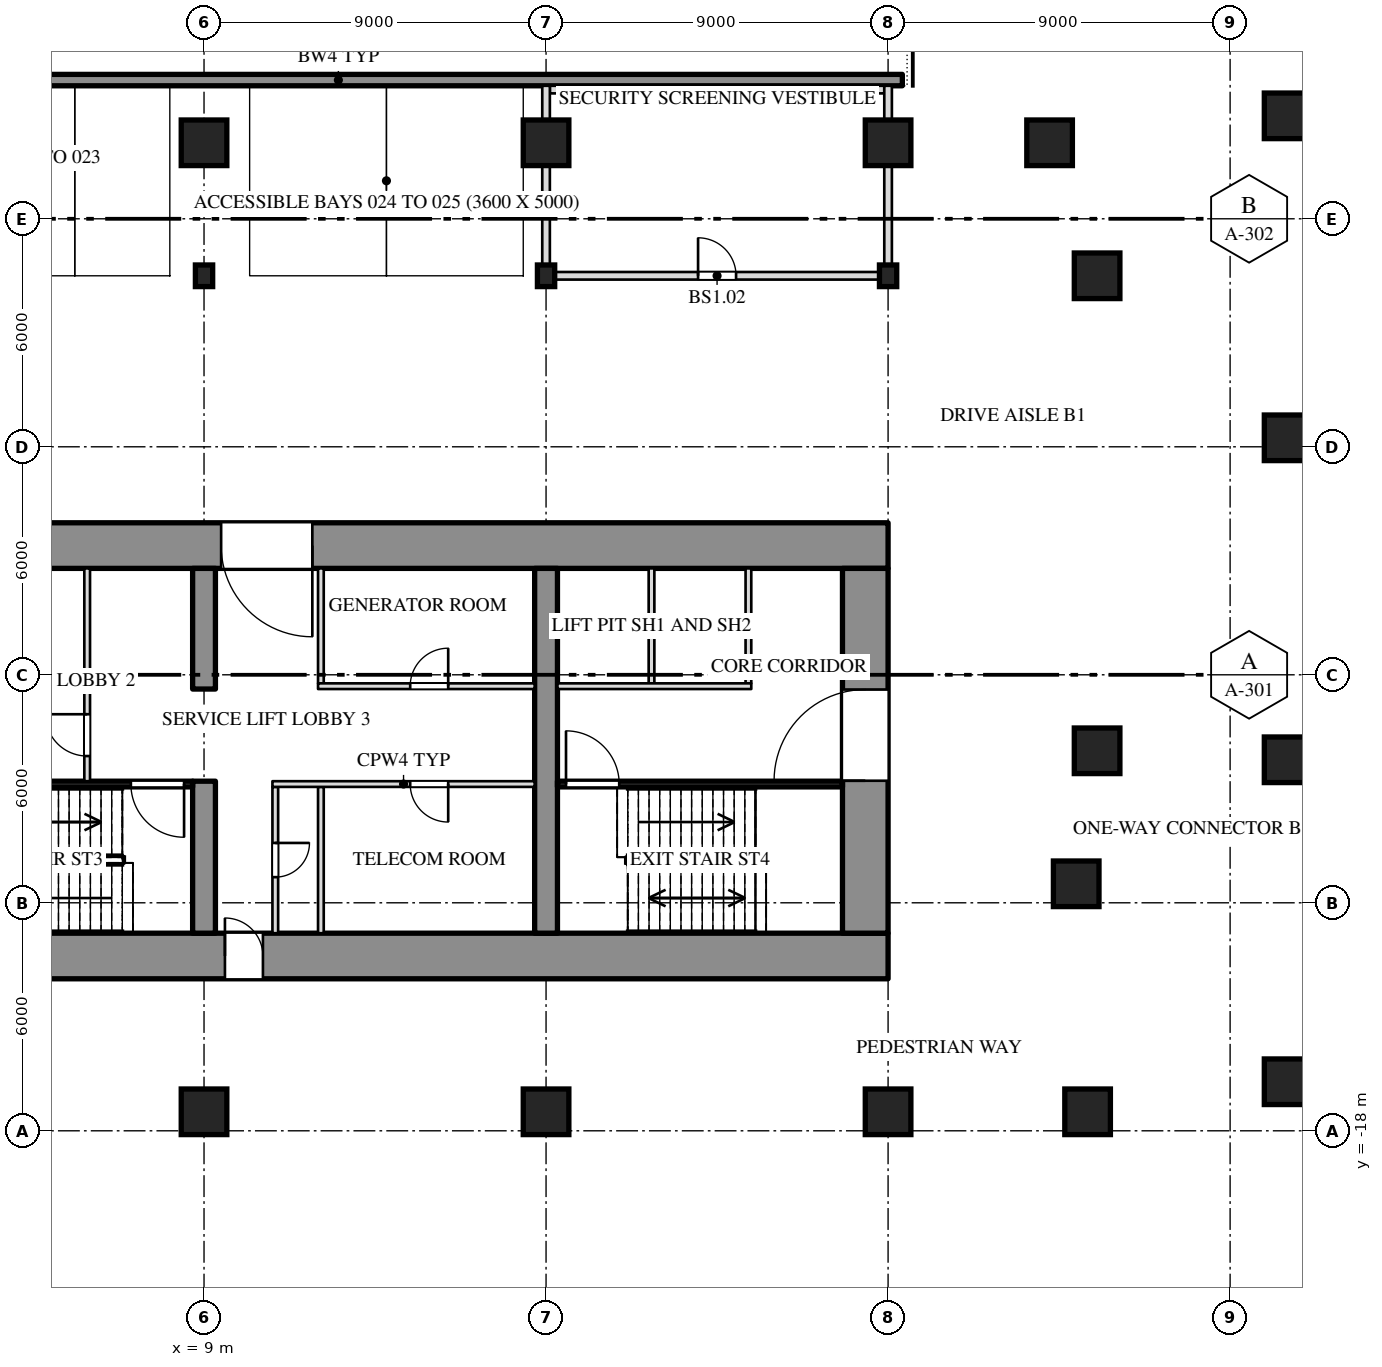
"""IFC4 building model, lengths in metres.
Left out: names, types, materials, properties, quantities, classifications, styles, units other than length and angle.
Written with IfcOpenShell. Run it as: python <this file> out.ifc"""

import sys

from ifc_helpers import new_model, si_unit, direction, frame, frame_2d, origin, origin_2d, place, context, subcontext, project, spatial, rectangle, i_section, extrude, element, fill, save


model = new_model("IFC4")
c1 = context("Model", 3, precision=1e-05, world=origin(), true_north=direction((0.0, 1.0)))
c2 = subcontext(c1, "Body", "Model", "MODEL_VIEW")
j1 = project(units=[si_unit("LENGTHUNIT", "METRE"), si_unit("PLANEANGLEUNIT", "RADIAN")], contexts=[c1])
p1 = place(None, origin())
s1 = spatial("IfcSite", under=j1, at=p1, CompositionType="ELEMENT")
p2 = place(p1, origin())
s2 = spatial("IfcBuilding", under=s1, at=p2, CompositionType="ELEMENT")
p3 = place(p2, frame((0.0, 0.0, -4.2)))
s3 = spatial("IfcBuildingStorey", under=s2, at=p3, CompositionType="ELEMENT", Elevation=-4.2)
for number, where, z_axis, x_axis in (
    (1, (9.0, -17.5, 0.0), (0.0, 0.0, 1.0), (1.0, 0.0, 0.0)),
    (2, (18.0, -17.5, 0.0), (0.0, 0.0, 1.0), (1.0, 0.0, 0.0)),
    (3, (27.0, -17.5, 0.0), (0.0, 0.0, 1.0), (1.0, 0.0, 0.0)),
    (4, (32.25, -17.5, 0.0), (0.0, 0.0, 1.0), (1.0, 0.0, 0.0)),
    (5, (37.5, -16.709, 0.0), (0.0, 0.0, 1.0), (1.0, 0.0, 0.0)),
    (6, (31.95, -11.5, 0.0), (0.0, 0.0, 1.0), (1.0, 0.0, 0.0)),
    (7, (37.5, -8.236, 0.0), (0.0, 0.0, 1.0), (1.0, 0.0, 0.0)),
    (8, (32.5, -8.0, 0.0), (0.0, 0.0, 1.0), (1.0, 0.0, 0.0)),
    (9, (37.5, 0.236, 0.0), (0.0, 0.0, 1.0), (1.0, 0.0, 0.0)),
):
    element("IfcColumn", number, at=place(p3, frame(where, z_axis=z_axis, x_axis=x_axis)), inside=s3, PredefinedType="COLUMN", context=c2, shape_type="SweptSolid", body=[
        extrude(rectangle(XDim=1.2, YDim=1.2, at=origin_2d()), origin(), (0.0, 0.0, 1.0), 4.2),
    ])
for number, where, z_axis, x_axis in (
    (10, (9.0, 4.5, 0.0), (0.0, 0.0, 1.0), (1.0, 0.0, 0.0)),
    (11, (18.0, 4.5, 0.0), (0.0, 0.0, 1.0), (1.0, 0.0, 0.0)),
    (12, (27.0, 4.5, 0.0), (0.0, 0.0, 1.0), (1.0, 0.0, 0.0)),
):
    element("IfcColumn", number, at=place(p3, frame(where, z_axis=z_axis, x_axis=x_axis)), inside=s3, PredefinedType="COLUMN", context=c2, shape_type="SweptSolid", body=[
        extrude(i_section(OverallWidth=0.455, OverallDepth=0.569, WebThickness=0.078, FlangeThickness=0.125, at=origin_2d()), origin(), (0.0, 0.0, 1.0), 4.2),
    ])
for number, where, z_axis, x_axis in (
    (13, (32.5, 4.5, 0.0), (0.0, 0.0, 1.0), (1.0, 0.0, 0.0)),
    (14, (9.0, 8.0, 0.0), (0.0, 0.0, 1.0), (1.0, 0.0, 0.0)),
    (15, (18.0, 8.0, 0.0), (0.0, 0.0, 1.0), (1.0, 0.0, 0.0)),
    (16, (27.0, 8.0, 0.0), (0.0, 0.0, 1.0), (1.0, 0.0, 0.0)),
    (17, (31.25, 8.0, 0.0), (0.0, 0.0, 1.0), (1.0, 0.0, 0.0)),
    (18, (37.5, 8.709, 0.0), (0.0, 0.0, 1.0), (1.0, 0.0, 0.0)),
):
    element("IfcColumn", number, at=place(p3, frame(where, z_axis=z_axis, x_axis=x_axis)), inside=s3, PredefinedType="COLUMN", context=c2, shape_type="SweptSolid", body=[
        extrude(rectangle(XDim=1.2, YDim=1.2, at=origin_2d()), origin(), (0.0, 0.0, 1.0), 4.2),
    ])
p4 = place(p3, frame((-27.0, -2.6, 0.0), z_axis=(0.0, 0.0, 1.0), x_axis=(1.0, 0.0, 0.0)))
e19 = element("IfcWall", 19, at=p4, inside=s3, PredefinedType="SHEAR", context=c2, shape_type="SweptSolid", body=[
    extrude(rectangle(XDim=54.0, YDim=1.2, at=frame_2d((27.0, 0.0))), origin(), (0.0, 0.0, 1.0), 3.9),
])
p5 = place(p4, frame((15.15, 0.0, 0.0)))
e20 = element("IfcOpeningElement", 20, at=p5, cuts=e19, PredefinedType="OPENING", context=c2, shape_type="SweptSolid", body=[
    extrude(rectangle(XDim=2.4, YDim=2.1, at=frame_2d((1.2, 1.05))), frame((0.0, 0.612, 0.0), z_axis=(0.0, -1.0, 0.0), x_axis=(1.0, 0.0, 0.0)), (0.0, 0.0, 1.0), 1.224),
])
p6 = place(p4, frame((36.45, 0.0, 0.0)))
e21 = element("IfcOpeningElement", 21, at=p6, cuts=e19, PredefinedType="OPENING", context=c2, shape_type="SweptSolid", body=[
    extrude(rectangle(XDim=2.4, YDim=2.1, at=frame_2d((1.2, 1.05))), frame((0.0, 0.612, 0.0), z_axis=(0.0, -1.0, 0.0), x_axis=(1.0, 0.0, 0.0)), (0.0, 0.0, 1.0), 1.224),
])
p7 = place(p3, frame((-27.0, -13.4, 0.0), z_axis=(0.0, 0.0, 1.0), x_axis=(1.0, 0.0, 0.0)))
e22 = element("IfcWall", 22, at=p7, inside=s3, PredefinedType="SHEAR", context=c2, shape_type="SweptSolid", body=[
    extrude(rectangle(XDim=54.0, YDim=1.2, at=frame_2d((27.0, 0.0))), origin(), (0.0, 0.0, 1.0), 3.9),
])
p8 = place(p7, frame((16.45, 0.0, 0.0)))
e23 = element("IfcOpeningElement", 23, at=p8, cuts=e22, PredefinedType="OPENING", context=c2, shape_type="SweptSolid", body=[
    extrude(rectangle(XDim=1.0, YDim=2.1, at=frame_2d((0.5, 1.05))), frame((0.0, 0.612, 0.0), z_axis=(0.0, -1.0, 0.0), x_axis=(1.0, 0.0, 0.0)), (0.0, 0.0, 1.0), 1.224),
])
p9 = place(p7, frame((36.55, 0.0, 0.0)))
e24 = element("IfcOpeningElement", 24, at=p9, cuts=e22, PredefinedType="OPENING", context=c2, shape_type="SweptSolid", body=[
    extrude(rectangle(XDim=1.0, YDim=2.1, at=frame_2d((0.5, 1.05))), frame((0.0, 0.612, 0.0), z_axis=(0.0, -1.0, 0.0), x_axis=(1.0, 0.0, 0.0)), (0.0, 0.0, 1.0), 1.224),
])
p10 = place(p3, frame((26.4, -12.8, 0.0), z_axis=(0.0, 0.0, 1.0), x_axis=(0.0, 1.0, 0.0)))
e25 = element("IfcWall", 25, at=p10, inside=s3, PredefinedType="SHEAR", context=c2, shape_type="SweptSolid", body=[
    extrude(rectangle(XDim=9.6, YDim=1.2, at=frame_2d((4.8, 0.0))), origin(), (0.0, 0.0, 1.0), 3.9),
])
p11 = place(p10, frame((4.012, 0.0, 0.0)))
e26 = element("IfcOpeningElement", 26, at=p11, cuts=e25, PredefinedType="OPENING", context=c2, shape_type="SweptSolid", body=[
    extrude(rectangle(XDim=2.4, YDim=2.1, at=frame_2d((1.2, 1.05))), frame((0.0, 0.612, 0.0), z_axis=(0.0, -1.0, 0.0), x_axis=(1.0, 0.0, 0.0)), (0.0, 0.0, 1.0), 1.224),
])
p12 = place(p3, frame((9.0, -12.8, 0.0), z_axis=(0.0, 0.0, 1.0), x_axis=(0.0, 1.0, 0.0)))
e27 = element("IfcWall", 27, at=p12, inside=s3, PredefinedType="SHEAR", context=c2, shape_type="SweptSolid", body=[
    extrude(rectangle(XDim=4.0, YDim=0.6, at=frame_2d((2.0, 0.0))), origin(), (0.0, 0.0, 1.0), 3.9),
])
p13 = place(p3, frame((9.0, -6.375, 0.0), z_axis=(0.0, 0.0, 1.0), x_axis=(0.0, 1.0, 0.0)))
e28 = element("IfcWall", 28, at=p13, inside=s3, PredefinedType="SHEAR", context=c2, shape_type="SweptSolid", body=[
    extrude(rectangle(XDim=3.175, YDim=0.6, at=frame_2d((1.587, 0.0))), origin(), (0.0, 0.0, 1.0), 3.9),
])
p14 = place(p3, frame((18.0, -12.8, 0.0), z_axis=(0.0, 0.0, 1.0), x_axis=(0.0, 1.0, 0.0)))
e29 = element("IfcWall", 29, at=p14, inside=s3, PredefinedType="SHEAR", context=c2, shape_type="SweptSolid", body=[
    extrude(rectangle(XDim=9.6, YDim=0.6, at=frame_2d((4.8, 0.0))), origin(), (0.0, 0.0, 1.0), 3.9),
])
p15 = place(p3, frame((18.227, 4.5, 0.0), z_axis=(0.0, 0.0, 1.0), x_axis=(1.0, 0.0, 0.0)))
e30 = element("IfcWall", 30, at=p15, inside=s3, PredefinedType="PARTITIONING", context=c2, shape_type="SweptSolid", body=[
    extrude(rectangle(XDim=8.545, YDim=0.2, at=frame_2d((4.273, 0.0))), origin(), (0.0, 0.0, 1.0), 3.288),
])
p16 = place(p15, frame((3.773, 0.0, 0.0)))
e31 = element("IfcOpeningElement", 31, at=p16, cuts=e30, PredefinedType="OPENING", context=c2, shape_type="SweptSolid", body=[
    extrude(rectangle(XDim=1.0, YDim=2.1, at=frame_2d((0.5, 1.05))), frame((0.0, 0.112, 0.0), z_axis=(0.0, -1.0, 0.0), x_axis=(1.0, 0.0, 0.0)), (0.0, 0.0, 1.0), 0.224),
])
p17 = place(p3, frame((18.1, 9.4, 0.0), z_axis=(0.0, 0.0, 1.0), x_axis=(1.0, 0.0, 0.0)))
e32 = element("IfcWall", 32, at=p17, inside=s3, PredefinedType="PARTITIONING", context=c2, shape_type="SweptSolid", body=[
    extrude(rectangle(XDim=8.8, YDim=0.2, at=frame_2d((4.4, 0.0))), origin(), (0.0, 0.0, 1.0), 3.288),
])
p18 = place(p3, frame((18.0, 4.784, 0.0), z_axis=(0.0, 0.0, 1.0), x_axis=(0.0, 1.0, 0.0)))
e33 = element("IfcWall", 33, at=p18, inside=s3, PredefinedType="PARTITIONING", context=c2, shape_type="SweptSolid", body=[
    extrude(rectangle(XDim=2.615, YDim=0.2, at=frame_2d((1.308, 0.0))), origin(), (0.0, 0.0, 1.0), 3.288),
])
p19 = place(p3, frame((18.0, 8.6, 0.0), z_axis=(0.0, 0.0, 1.0), x_axis=(0.0, 1.0, 0.0)))
e34 = element("IfcWall", 34, at=p19, inside=s3, PredefinedType="PARTITIONING", context=c2, shape_type="SweptSolid", body=[
    extrude(rectangle(XDim=0.9, YDim=0.2, at=frame_2d((0.45, 0.0))), origin(), (0.0, 0.0, 1.0), 3.288),
])
p20 = place(p3, frame((27.0, 4.784, 0.0), z_axis=(0.0, 0.0, 1.0), x_axis=(0.0, 1.0, 0.0)))
e35 = element("IfcWall", 35, at=p20, inside=s3, PredefinedType="PARTITIONING", context=c2, shape_type="SweptSolid", body=[
    extrude(rectangle(XDim=2.615, YDim=0.2, at=frame_2d((1.308, 0.0))), origin(), (0.0, 0.0, 1.0), 3.288),
])
p21 = place(p3, frame((27.0, 8.6, 0.0), z_axis=(0.0, 0.0, 1.0), x_axis=(0.0, 1.0, 0.0)))
e36 = element("IfcWall", 36, at=p21, inside=s3, PredefinedType="PARTITIONING", context=c2, shape_type="SweptSolid", body=[
    extrude(rectangle(XDim=0.9, YDim=0.2, at=frame_2d((0.45, 0.0))), origin(), (0.0, 0.0, 1.0), 3.288),
])
p22 = place(p3, frame((-2.305, 9.65, 0.0), z_axis=(0.0, 0.0, 1.0), x_axis=(1.0, 0.0, 0.0)))
e37 = element("IfcWall", 37, at=p22, inside=s3, PredefinedType="SOLIDWALL", context=c2, shape_type="SweptSolid", body=[
    extrude(rectangle(XDim=29.68, YDim=0.3, at=frame_2d((14.84, 0.0))), origin(), (0.0, 0.0, 1.0), 1.1),
])
for number, where, z_axis, x_axis in (
    (38, (5.925, -6.225, 0.0), (0.0, 0.0, 1.0), (0.0, 1.0, 0.0)),
    (39, (12.075, -6.225, 0.0), (0.0, 0.0, 1.0), (0.0, 1.0, 0.0)),
    (40, (20.775, -6.225, 0.0), (0.0, 0.0, 1.0), (0.0, 1.0, 0.0)),
    (41, (23.325, -6.225, 0.0), (0.0, 0.0, 1.0), (0.0, 1.0, 0.0)),
):
    element("IfcWall", number, at=place(p3, frame(where, z_axis=z_axis, x_axis=x_axis)), inside=s3, PredefinedType="PARTITIONING", context=c2, shape_type="SweptSolid", body=[
        extrude(rectangle(XDim=3.025, YDim=0.15, at=frame_2d((1.513, 0.0))), origin(), (0.0, 0.0, 1.0), 3.9),
    ])
p23 = place(p3, frame((10.875, -12.8, 0.0), z_axis=(0.0, 0.0, 1.0), x_axis=(0.0, 1.0, 0.0)))
e42 = element("IfcWall", 42, at=p23, inside=s3, PredefinedType="PARTITIONING", context=c2, shape_type="SweptSolid", body=[
    extrude(rectangle(XDim=3.85, YDim=0.15, at=frame_2d((1.925, 0.0))), origin(), (0.0, 0.0, 1.0), 3.9),
])
p24 = place(p23, frame((1.475, 0.0, 0.0)))
e43 = element("IfcOpeningElement", 43, at=p24, cuts=e42, PredefinedType="OPENING", context=c2, shape_type="SweptSolid", body=[
    extrude(rectangle(XDim=0.9, YDim=2.1, at=frame_2d((0.45, 1.05))), frame((0.0, 0.087, 0.0), z_axis=(0.0, -1.0, 0.0), x_axis=(1.0, 0.0, 0.0)), (0.0, 0.0, 1.0), 0.174),
])
p25 = place(p3, frame((12.075, -12.8, 0.0), z_axis=(0.0, 0.0, 1.0), x_axis=(0.0, 1.0, 0.0)))
e44 = element("IfcWall", 44, at=p25, inside=s3, PredefinedType="PARTITIONING", context=c2, shape_type="SweptSolid", body=[
    extrude(rectangle(XDim=3.85, YDim=0.15, at=frame_2d((1.925, 0.0))), origin(), (0.0, 0.0, 1.0), 3.9),
])
p26 = place(p3, frame((5.925, -8.8, 0.0), z_axis=(0.0, 0.0, 1.0), x_axis=(0.0, 1.0, 0.0)))
e45 = element("IfcWall", 45, at=p26, inside=s3, PredefinedType="PARTITIONING", context=c2, shape_type="SweptSolid", body=[
    extrude(rectangle(XDim=2.425, YDim=0.15, at=frame_2d((1.212, 0.0))), origin(), (0.0, 0.0, 1.0), 3.9),
])
p27 = place(p26, frame((0.662, 0.0, 0.0)))
e46 = element("IfcOpeningElement", 46, at=p27, cuts=e45, PredefinedType="OPENING", context=c2, shape_type="SweptSolid", body=[
    extrude(rectangle(XDim=1.1, YDim=2.1, at=frame_2d((0.55, 1.05))), frame((0.0, 0.087, 0.0), z_axis=(0.0, -1.0, 0.0), x_axis=(1.0, 0.0, 0.0)), (0.0, 0.0, 1.0), 0.174),
])
p28 = place(p3, frame((12.0, -6.3, 0.0), z_axis=(0.0, 0.0, 1.0), x_axis=(1.0, 0.0, 0.0)))
e47 = element("IfcWall", 47, at=p28, inside=s3, PredefinedType="PARTITIONING", context=c2, shape_type="SweptSolid", body=[
    extrude(rectangle(XDim=5.7, YDim=0.15, at=frame_2d((2.85, 0.0))), origin(), (0.0, 0.0, 1.0), 3.9),
])
p29 = place(p28, frame((2.425, 0.0, 0.0)))
e48 = element("IfcOpeningElement", 48, at=p29, cuts=e47, PredefinedType="OPENING", context=c2, shape_type="SweptSolid", body=[
    extrude(rectangle(XDim=1.0, YDim=2.1, at=frame_2d((0.5, 1.05))), frame((0.0, 0.087, 0.0), z_axis=(0.0, -1.0, 0.0), x_axis=(1.0, 0.0, 0.0)), (0.0, 0.0, 1.0), 0.174),
])
p30 = place(p3, frame((18.3, -6.3, 0.0), z_axis=(0.0, 0.0, 1.0), x_axis=(1.0, 0.0, 0.0)))
e49 = element("IfcWall", 49, at=p30, inside=s3, PredefinedType="PARTITIONING", context=c2, shape_type="SweptSolid", body=[
    extrude(rectangle(XDim=5.1, YDim=0.15, at=frame_2d((2.55, 0.0))), origin(), (0.0, 0.0, 1.0), 3.9),
])
p31 = place(p3, frame((0.3, -8.875, 0.0), z_axis=(0.0, 0.0, 1.0), x_axis=(1.0, 0.0, 0.0)))
e50 = element("IfcWall", 50, at=p31, inside=s3, PredefinedType="SHEAR", context=c2, shape_type="SweptSolid", body=[
    extrude(rectangle(XDim=8.4, YDim=0.15, at=frame_2d((4.2, 0.0))), origin(), (0.0, 0.0, 1.0), 3.9),
])
p32 = place(p31, frame((6.775, 0.0, 0.0)))
e51 = element("IfcOpeningElement", 51, at=p32, cuts=e50, PredefinedType="OPENING", context=c2, shape_type="SweptSolid", body=[
    extrude(rectangle(XDim=1.4, YDim=2.1, at=frame_2d((0.7, 1.05))), frame((0.0, 0.087, 0.0), z_axis=(0.0, -1.0, 0.0), x_axis=(1.0, 0.0, 0.0)), (0.0, 0.0, 1.0), 0.174),
])
p33 = place(p3, frame((10.8, -8.875, 0.0), z_axis=(0.0, 0.0, 1.0), x_axis=(1.0, 0.0, 0.0)))
e52 = element("IfcWall", 52, at=p33, inside=s3, PredefinedType="PARTITIONING", context=c2, shape_type="SweptSolid", body=[
    extrude(rectangle(XDim=6.9, YDim=0.15, at=frame_2d((3.45, 0.0))), origin(), (0.0, 0.0, 1.0), 3.9),
])
p34 = place(p33, frame((3.625, 0.0, 0.0)))
e53 = element("IfcOpeningElement", 53, at=p34, cuts=e52, PredefinedType="OPENING", context=c2, shape_type="SweptSolid", body=[
    extrude(rectangle(XDim=1.0, YDim=2.1, at=frame_2d((0.5, 1.05))), frame((0.0, 0.087, 0.0), z_axis=(0.0, -1.0, 0.0), x_axis=(1.0, 0.0, 0.0)), (0.0, 0.0, 1.0), 0.174),
])
p35 = place(p3, frame((18.3, -8.875, 0.0), z_axis=(0.0, 0.0, 1.0), x_axis=(1.0, 0.0, 0.0)))
e54 = element("IfcWall", 54, at=p35, inside=s3, PredefinedType="SHEAR", context=c2, shape_type="SweptSolid", body=[
    extrude(rectangle(XDim=7.5, YDim=0.15, at=frame_2d((3.75, 0.0))), origin(), (0.0, 0.0, 1.0), 3.9),
])
p36 = place(p35, frame((0.225, 0.0, 0.0)))
e55 = element("IfcOpeningElement", 55, at=p36, cuts=e54, PredefinedType="OPENING", context=c2, shape_type="SweptSolid", body=[
    extrude(rectangle(XDim=1.4, YDim=2.1, at=frame_2d((0.7, 1.05))), frame((0.0, 0.087, 0.0), z_axis=(0.0, -1.0, 0.0), x_axis=(1.0, 0.0, 0.0)), (0.0, 0.0, 1.0), 0.174),
])
p37 = place(p16, origin())
e56 = element("IfcDoor", 56, at=p37, inside=s3, OperationType="SINGLE_SWING_LEFT", PredefinedType="DOOR", context=c2, shape_type="SweptSolid", body=[
    extrude(rectangle(XDim=1.0, YDim=2.1, at=frame_2d((0.5, 1.05))), frame((0.0, 0.025, 0.0), z_axis=(0.0, -1.0, 0.0), x_axis=(1.0, 0.0, 0.0)), (0.0, 0.0, 1.0), 0.05),
])
fill(e31, e56)
p38 = place(p27, origin())
e57 = element("IfcDoor", 57, at=p38, inside=s3, OperationType="SINGLE_SWING_RIGHT", PredefinedType="DOOR", context=c2, shape_type="SweptSolid", body=[
    extrude(rectangle(XDim=1.1, YDim=2.1, at=frame_2d((0.55, 1.05))), frame((0.0, 0.025, 0.0), z_axis=(0.0, -1.0, 0.0), x_axis=(1.0, 0.0, 0.0)), (0.0, 0.0, 1.0), 0.05),
])
fill(e46, e57)
p39 = place(p32, origin())
e58 = element("IfcDoor", 58, at=p39, inside=s3, OperationType="DOUBLE_DOOR_SINGLE_SWING", PredefinedType="DOOR", context=c2, shape_type="SweptSolid", body=[
    extrude(rectangle(XDim=1.4, YDim=2.1, at=frame_2d((0.7, 1.05))), frame((0.0, 0.025, 0.0), z_axis=(0.0, -1.0, 0.0), x_axis=(1.0, 0.0, 0.0)), (0.0, 0.0, 1.0), 0.05),
])
fill(e51, e58)
p40 = place(p9, origin())
e59 = element("IfcDoor", 59, at=p40, inside=s3, OperationType="SINGLE_SWING_LEFT", PredefinedType="DOOR", context=c2, shape_type="SweptSolid", body=[
    extrude(rectangle(XDim=1.0, YDim=2.1, at=frame_2d((0.5, 1.05))), frame((0.0, 0.025, 0.0), z_axis=(0.0, -1.0, 0.0), x_axis=(1.0, 0.0, 0.0)), (0.0, 0.0, 1.0), 0.05),
])
fill(e24, e59)
p41 = place(p6, origin())
e60 = element("IfcDoor", 60, at=p41, inside=s3, OperationType="DOUBLE_DOOR_SINGLE_SWING", PredefinedType="DOOR", context=c2, shape_type="SweptSolid", body=[
    extrude(rectangle(XDim=2.4, YDim=2.1, at=frame_2d((1.2, 1.05))), frame((0.0, 0.025, 0.0), z_axis=(0.0, -1.0, 0.0), x_axis=(1.0, 0.0, 0.0)), (0.0, 0.0, 1.0), 0.05),
])
fill(e21, e60)
p42 = place(p24, origin())
e61 = element("IfcDoor", 61, at=p42, inside=s3, OperationType="SINGLE_SWING_LEFT", PredefinedType="DOOR", context=c2, shape_type="SweptSolid", body=[
    extrude(rectangle(XDim=0.9, YDim=2.1, at=frame_2d((0.45, 1.05))), frame((0.0, 0.025, 0.0), z_axis=(0.0, -1.0, 0.0), x_axis=(1.0, 0.0, 0.0)), (0.0, 0.0, 1.0), 0.05),
])
fill(e43, e61)
p43 = place(p34, origin())
e62 = element("IfcDoor", 62, at=p43, inside=s3, OperationType="SINGLE_SWING_LEFT", PredefinedType="DOOR", context=c2, shape_type="SweptSolid", body=[
    extrude(rectangle(XDim=1.0, YDim=2.1, at=frame_2d((0.5, 1.05))), frame((0.0, 0.025, 0.0), z_axis=(0.0, -1.0, 0.0), x_axis=(1.0, 0.0, 0.0)), (0.0, 0.0, 1.0), 0.05),
])
fill(e53, e62)
p44 = place(p29, origin())
e63 = element("IfcDoor", 63, at=p44, inside=s3, OperationType="SINGLE_SWING_RIGHT", PredefinedType="DOOR", context=c2, shape_type="SweptSolid", body=[
    extrude(rectangle(XDim=1.0, YDim=2.1, at=frame_2d((0.5, 1.05))), frame((0.0, 0.025, 0.0), z_axis=(0.0, -1.0, 0.0), x_axis=(1.0, 0.0, 0.0)), (0.0, 0.0, 1.0), 0.05),
])
fill(e48, e63)
p45 = place(p36, origin())
e64 = element("IfcDoor", 64, at=p45, inside=s3, OperationType="DOUBLE_DOOR_SINGLE_SWING", PredefinedType="DOOR", context=c2, shape_type="SweptSolid", body=[
    extrude(rectangle(XDim=1.4, YDim=2.1, at=frame_2d((0.7, 1.05))), frame((0.0, 0.025, 0.0), z_axis=(0.0, -1.0, 0.0), x_axis=(1.0, 0.0, 0.0)), (0.0, 0.0, 1.0), 0.05),
])
fill(e55, e64)
p46 = place(p11, origin())
e65 = element("IfcDoor", 65, at=p46, inside=s3, OperationType="DOUBLE_DOOR_SINGLE_SWING", PredefinedType="DOOR", context=c2, shape_type="SweptSolid", body=[
    extrude(rectangle(XDim=2.4, YDim=2.1, at=frame_2d((1.2, 1.05))), frame((0.0, 0.025, 0.0), z_axis=(0.0, -1.0, 0.0), x_axis=(1.0, 0.0, 0.0)), (0.0, 0.0, 1.0), 0.05),
])
fill(e26, e65)
save(model, sys.argv[1])
